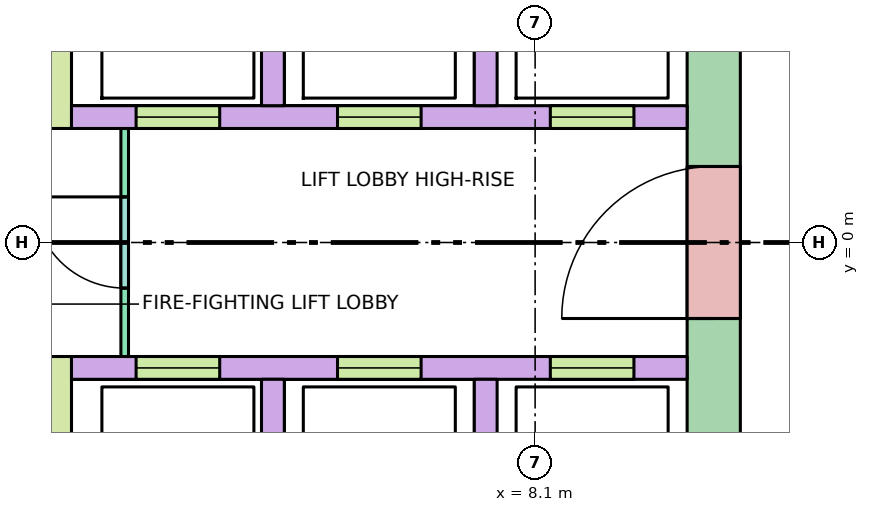
"""IFC4 building model, lengths in metres.
Left out: names, types, materials, properties, quantities, classifications, styles, units other than length and angle.
Written with IfcOpenShell. Run it as: python <this file> out.ifc"""

import sys

from ifc_helpers import new_model, si_unit, direction, frame, frame_2d, origin, place, context, subcontext, project, spatial, rectangle, extrude, element, fill, save


model = new_model("IFC4")
c1 = context("Model", 3, precision=1e-05, world=origin(), true_north=direction((0.0, 1.0)))
c2 = subcontext(c1, "Body", "Model", "MODEL_VIEW")
j1 = project(units=[si_unit("LENGTHUNIT", "METRE"), si_unit("PLANEANGLEUNIT", "RADIAN")], contexts=[c1])
p1 = place(None, origin())
s1 = spatial("IfcSite", under=j1, at=p1, CompositionType="ELEMENT")
p2 = place(p1, origin())
s2 = spatial("IfcBuilding", under=s1, at=p2, CompositionType="ELEMENT")
p3 = place(p2, frame((0.0, 0.0, 154.2)))
s3 = spatial("IfcBuildingStorey", under=s2, at=p3, CompositionType="ELEMENT", Elevation=154.2)
p4 = place(p3, frame((10.45, -5.13, -0.28), z_axis=(0.0, 0.0, 1.0), x_axis=(0.0, 1.0, 0.0)))
e1 = element("IfcWall", 1, at=p4, inside=s3, PredefinedType="SHEAR", context=c2, shape_type="SweptSolid", body=[
    extrude(rectangle(XDim=10.26, YDim=0.7, at=frame_2d((5.13, 0.0))), origin(), (0.0, 0.0, 1.0), 3.7),
])
p5 = place(p4, frame((4.13, 0.0, 0.28)))
e2 = element("IfcOpeningElement", 2, at=p5, cuts=e1, PredefinedType="OPENING", context=c2, shape_type="SweptSolid", body=[
    extrude(rectangle(XDim=2.0, YDim=2.1, at=frame_2d((1.0, 1.05))), frame((0.0, 0.36, 0.0), z_axis=(0.0, -1.0, 0.0), x_axis=(1.0, 0.0, 0.0)), (0.0, 0.0, 1.0), 0.72),
])
p6 = place(p3, frame((2.0, 1.65, 0.0), z_axis=(0.0, 0.0, 1.0), x_axis=(1.0, 0.0, 0.0)))
e3 = element("IfcWall", 3, at=p6, inside=s3, PredefinedType="SOLIDWALL", context=c2, shape_type="SweptSolid", body=[
    extrude(rectangle(XDim=8.1, YDim=0.3, at=frame_2d((4.05, 0.0))), origin(), (0.0, 0.0, 1.0), 3.42),
])
p7 = place(p6, frame((0.85, 0.0, 0.0)))
e4 = element("IfcOpeningElement", 4, at=p7, cuts=e3, PredefinedType="OPENING", context=c2, shape_type="SweptSolid", body=[
    extrude(rectangle(XDim=1.1, YDim=2.1, at=frame_2d((0.55, 1.05))), frame((0.0, 0.16, 0.0), z_axis=(0.0, -1.0, 0.0), x_axis=(1.0, 0.0, 0.0)), (0.0, 0.0, 1.0), 0.32),
])
p8 = place(p6, frame((3.5, 0.0, 0.0)))
e5 = element("IfcOpeningElement", 5, at=p8, cuts=e3, PredefinedType="OPENING", context=c2, shape_type="SweptSolid", body=[
    extrude(rectangle(XDim=1.1, YDim=2.1, at=frame_2d((0.55, 1.05))), frame((0.0, 0.16, 0.0), z_axis=(0.0, -1.0, 0.0), x_axis=(1.0, 0.0, 0.0)), (0.0, 0.0, 1.0), 0.32),
])
p9 = place(p6, frame((6.3, 0.0, 0.0)))
e6 = element("IfcOpeningElement", 6, at=p9, cuts=e3, PredefinedType="OPENING", context=c2, shape_type="SweptSolid", body=[
    extrude(rectangle(XDim=1.1, YDim=2.1, at=frame_2d((0.55, 1.05))), frame((0.0, 0.16, 0.0), z_axis=(0.0, -1.0, 0.0), x_axis=(1.0, 0.0, 0.0)), (0.0, 0.0, 1.0), 0.32),
])
p10 = place(p3, frame((2.0, -1.65, 0.0), z_axis=(0.0, 0.0, 1.0), x_axis=(1.0, 0.0, 0.0)))
e7 = element("IfcWall", 7, at=p10, inside=s3, PredefinedType="SOLIDWALL", context=c2, shape_type="SweptSolid", body=[
    extrude(rectangle(XDim=8.1, YDim=0.3, at=frame_2d((4.05, 0.0))), origin(), (0.0, 0.0, 1.0), 3.42),
])
p11 = place(p10, frame((0.85, 0.0, 0.0)))
e8 = element("IfcOpeningElement", 8, at=p11, cuts=e7, PredefinedType="OPENING", context=c2, shape_type="SweptSolid", body=[
    extrude(rectangle(XDim=1.1, YDim=2.1, at=frame_2d((0.55, 1.05))), frame((0.0, 0.16, 0.0), z_axis=(0.0, -1.0, 0.0), x_axis=(1.0, 0.0, 0.0)), (0.0, 0.0, 1.0), 0.32),
])
p12 = place(p10, frame((3.5, 0.0, 0.0)))
e9 = element("IfcOpeningElement", 9, at=p12, cuts=e7, PredefinedType="OPENING", context=c2, shape_type="SweptSolid", body=[
    extrude(rectangle(XDim=1.1, YDim=2.1, at=frame_2d((0.55, 1.05))), frame((0.0, 0.16, 0.0), z_axis=(0.0, -1.0, 0.0), x_axis=(1.0, 0.0, 0.0)), (0.0, 0.0, 1.0), 0.32),
])
p13 = place(p10, frame((6.3, 0.0, 0.0)))
e10 = element("IfcOpeningElement", 10, at=p13, cuts=e7, PredefinedType="OPENING", context=c2, shape_type="SweptSolid", body=[
    extrude(rectangle(XDim=1.1, YDim=2.1, at=frame_2d((0.55, 1.05))), frame((0.0, 0.16, 0.0), z_axis=(0.0, -1.0, 0.0), x_axis=(1.0, 0.0, 0.0)), (0.0, 0.0, 1.0), 0.32),
])
for number, where, z_axis, x_axis in (
    (11, (4.65, 1.8, 0.0), (0.0, 0.0, 1.0), (0.0, 1.0, 0.0)),
    (12, (4.65, -4.2, 0.0), (0.0, 0.0, 1.0), (0.0, 1.0, 0.0)),
    (13, (7.45, 1.8, 0.0), (0.0, 0.0, 1.0), (0.0, 1.0, 0.0)),
    (14, (7.45, -4.2, 0.0), (0.0, 0.0, 1.0), (0.0, 1.0, 0.0)),
):
    element("IfcWall", number, at=place(p3, frame(where, z_axis=z_axis, x_axis=x_axis)), inside=s3, PredefinedType="SOLIDWALL", context=c2, shape_type="SweptSolid", body=[
        extrude(rectangle(XDim=2.4, YDim=0.3, at=frame_2d((1.2, 0.0))), origin(), (0.0, 0.0, 1.0), 3.42),
    ])
for number, where, z_axis, x_axis in (
    (15, (1.85, 1.5, 0.0), (0.0, 0.0, 1.0), (0.0, 1.0, 0.0)),
    (16, (1.85, -8.1, 0.0), (0.0, 0.0, 1.0), (0.0, 1.0, 0.0)),
):
    element("IfcWall", number, at=place(p3, frame(where, z_axis=z_axis, x_axis=x_axis)), inside=s3, PredefinedType="SHEAR", context=c2, shape_type="SweptSolid", body=[
        extrude(rectangle(XDim=6.6, YDim=0.3, at=frame_2d((3.3, 0.0))), origin(), (0.0, 0.0, 1.0), 3.42),
    ])
p14 = place(p3, frame((2.7, -1.5, 0.0), z_axis=(0.0, 0.0, 1.0), x_axis=(0.0, 1.0, 0.0)))
e17 = element("IfcWall", 17, at=p14, inside=s3, PredefinedType="PARTITIONING", context=c2, shape_type="SweptSolid", body=[
    extrude(rectangle(XDim=3.0, YDim=0.1, at=frame_2d((1.5, 0.0))), origin(), (0.0, 0.0, 1.0), 3.42),
])
p15 = place(p14, frame((0.9, 0.0, 0.0)))
e18 = element("IfcOpeningElement", 18, at=p15, cuts=e17, PredefinedType="OPENING", context=c2, shape_type="SweptSolid", body=[
    extrude(rectangle(XDim=1.2, YDim=2.1, at=frame_2d((0.6, 1.05))), frame((0.0, 0.06, 0.0), z_axis=(0.0, -1.0, 0.0), x_axis=(1.0, 0.0, 0.0)), (0.0, 0.0, 1.0), 0.12),
])
p16 = place(p7, origin())
e19 = element("IfcDoor", 19, at=p16, inside=s3, OperationType="DOUBLE_DOOR_SLIDING", PredefinedType="DOOR", context=c2, shape_type="SweptSolid", body=[
    extrude(rectangle(XDim=1.1, YDim=2.1, at=frame_2d((0.55, 1.05))), frame((0.0, 0.025, 0.0), z_axis=(0.0, -1.0, 0.0), x_axis=(1.0, 0.0, 0.0)), (0.0, 0.0, 1.0), 0.05),
])
fill(e4, e19)
p17 = place(p8, origin())
e20 = element("IfcDoor", 20, at=p17, inside=s3, OperationType="DOUBLE_DOOR_SLIDING", PredefinedType="DOOR", context=c2, shape_type="SweptSolid", body=[
    extrude(rectangle(XDim=1.1, YDim=2.1, at=frame_2d((0.55, 1.05))), frame((0.0, 0.025, 0.0), z_axis=(0.0, -1.0, 0.0), x_axis=(1.0, 0.0, 0.0)), (0.0, 0.0, 1.0), 0.05),
])
fill(e5, e20)
p18 = place(p9, origin())
e21 = element("IfcDoor", 21, at=p18, inside=s3, OperationType="DOUBLE_DOOR_SLIDING", PredefinedType="DOOR", context=c2, shape_type="SweptSolid", body=[
    extrude(rectangle(XDim=1.1, YDim=2.1, at=frame_2d((0.55, 1.05))), frame((0.0, 0.025, 0.0), z_axis=(0.0, -1.0, 0.0), x_axis=(1.0, 0.0, 0.0)), (0.0, 0.0, 1.0), 0.05),
])
fill(e6, e21)
p19 = place(p11, origin())
e22 = element("IfcDoor", 22, at=p19, inside=s3, OperationType="DOUBLE_DOOR_SLIDING", PredefinedType="DOOR", context=c2, shape_type="SweptSolid", body=[
    extrude(rectangle(XDim=1.1, YDim=2.1, at=frame_2d((0.55, 1.05))), frame((0.0, 0.025, 0.0), z_axis=(0.0, -1.0, 0.0), x_axis=(1.0, 0.0, 0.0)), (0.0, 0.0, 1.0), 0.05),
])
fill(e8, e22)
p20 = place(p12, origin())
e23 = element("IfcDoor", 23, at=p20, inside=s3, OperationType="DOUBLE_DOOR_SLIDING", PredefinedType="DOOR", context=c2, shape_type="SweptSolid", body=[
    extrude(rectangle(XDim=1.1, YDim=2.1, at=frame_2d((0.55, 1.05))), frame((0.0, 0.025, 0.0), z_axis=(0.0, -1.0, 0.0), x_axis=(1.0, 0.0, 0.0)), (0.0, 0.0, 1.0), 0.05),
])
fill(e9, e23)
p21 = place(p13, origin())
e24 = element("IfcDoor", 24, at=p21, inside=s3, OperationType="DOUBLE_DOOR_SLIDING", PredefinedType="DOOR", context=c2, shape_type="SweptSolid", body=[
    extrude(rectangle(XDim=1.1, YDim=2.1, at=frame_2d((0.55, 1.05))), frame((0.0, 0.025, 0.0), z_axis=(0.0, -1.0, 0.0), x_axis=(1.0, 0.0, 0.0)), (0.0, 0.0, 1.0), 0.05),
])
fill(e10, e24)
p22 = place(p5, origin())
e25 = element("IfcDoor", 25, at=p22, inside=s3, OperationType="DOUBLE_DOOR_SINGLE_SWING", PredefinedType="DOOR", context=c2, shape_type="SweptSolid", body=[
    extrude(rectangle(XDim=2.0, YDim=2.1, at=frame_2d((1.0, 1.05))), frame((0.0, 0.025, 0.0), z_axis=(0.0, -1.0, 0.0), x_axis=(1.0, 0.0, 0.0)), (0.0, 0.0, 1.0), 0.05),
])
fill(e2, e25)
p23 = place(p15, origin())
e26 = element("IfcDoor", 26, at=p23, inside=s3, OperationType="SINGLE_SWING_RIGHT", PredefinedType="DOOR", context=c2, shape_type="SweptSolid", body=[
    extrude(rectangle(XDim=1.2, YDim=2.1, at=frame_2d((0.6, 1.05))), frame((0.0, 0.025, 0.0), z_axis=(0.0, -1.0, 0.0), x_axis=(1.0, 0.0, 0.0)), (0.0, 0.0, 1.0), 0.05),
])
fill(e18, e26)
save(model, sys.argv[1])
